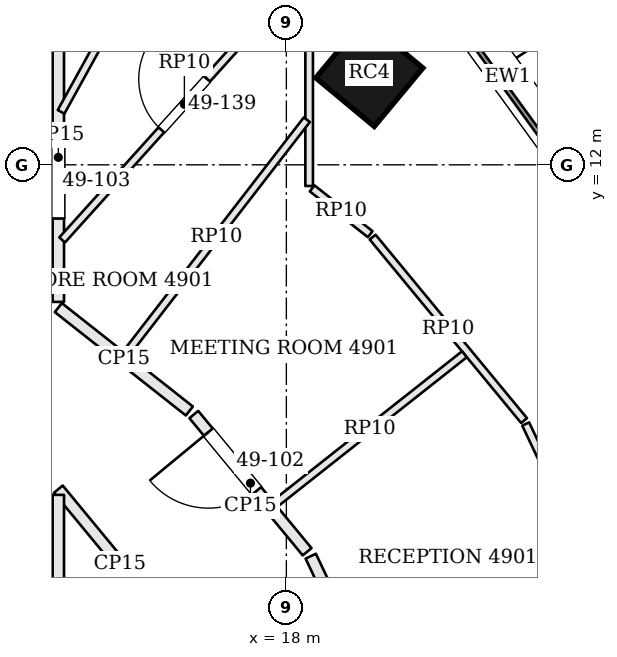
"""IFC4 building model, lengths in metres.
Left out: names, types, materials, properties, quantities, classifications, styles, units other than length and angle.
Written with IfcOpenShell. Run it as: python <this file> out.ifc"""

import sys

from ifc_helpers import new_model, si_unit, direction, frame, frame_2d, origin, origin_2d, place, context, subcontext, project, spatial, rectangle, extrude, element, fill, save


model = new_model("IFC4")
c1 = context("Model", 3, precision=1e-05, world=origin(), true_north=direction((0.0, 1.0)))
c2 = subcontext(c1, "Body", "Model", "MODEL_VIEW")
j1 = project(units=[si_unit("LENGTHUNIT", "METRE"), si_unit("PLANEANGLEUNIT", "RADIAN")], contexts=[c1])
p1 = place(None, origin())
s1 = spatial("IfcSite", under=j1, at=p1, CompositionType="ELEMENT")
p2 = place(p1, origin())
s2 = spatial("IfcBuilding", under=s1, at=p2, CompositionType="ELEMENT")
p3 = place(p2, frame((0.0, 0.0, 201.3)))
s3 = spatial("IfcBuildingStorey", under=s2, at=p3, CompositionType="ELEMENT", Elevation=201.3)
p4 = place(p3, frame((19.092, 13.209, 0.0), z_axis=(0.0, 0.0, 1.0), x_axis=(-0.76886986222, 0.63940529789, 0.0)))
e1 = element("IfcColumn", 1, at=p4, inside=s3, PredefinedType="COLUMN", context=c2, shape_type="SweptSolid", body=[
    extrude(rectangle(XDim=1.0, YDim=1.0, at=origin_2d()), origin(), (0.0, 0.0, 1.0), 3.9),
])
p5 = place(p3, frame((21.872, 11.841, 0.0), z_axis=(0.0, 0.0, 1.0), x_axis=(-0.587562050363, 0.809179113036, 0.0)))
e2 = element("IfcWall", 2, at=p5, inside=s3, PredefinedType="SOLIDWALL", context=c2, shape_type="SweptSolid", body=[
    extrude(rectangle(XDim=3.263, YDim=0.45, at=frame_2d((1.631, 0.0))), origin(), (0.0, 0.0, 1.0), 3.7),
])
p6 = place(p5, frame((0.582, 0.0, 0.9)))
e3 = element("IfcOpeningElement", 3, at=p6, cuts=e2, PredefinedType="OPENING", context=c2, shape_type="SweptSolid", body=[
    extrude(rectangle(XDim=2.1, YDim=2.3, at=frame_2d((1.05, 1.15))), frame((0.0, 0.235, 0.0), z_axis=(0.0, -1.0, 0.0), x_axis=(1.0, 0.0, 0.0)), (0.0, 0.0, 1.0), 0.47),
])
p7 = place(p3, frame((19.305, 4.773, 0.0), z_axis=(0.0, 0.0, 1.0), x_axis=(-0.428173054138, 0.903696760927, 0.0)))
e4 = element("IfcWall", 4, at=p7, inside=s3, PredefinedType="PARTITIONING", context=c2, shape_type="SweptSolid", body=[
    extrude(rectangle(XDim=2.3, YDim=0.15, at=frame_2d((1.15, 0.0))), origin(), (0.0, 0.0, 1.0), 3.084),
])
p8 = place(p7, frame((0.65, 0.0, 0.0)))
e5 = element("IfcOpeningElement", 5, at=p8, cuts=e4, PredefinedType="OPENING", context=c2, shape_type="SweptSolid", body=[
    extrude(rectangle(XDim=1.0, YDim=2.1, at=frame_2d((0.5, 1.05))), frame((0.0, 0.085, 0.0), z_axis=(0.0, -1.0, 0.0), x_axis=(1.0, 0.0, 0.0)), (0.0, 0.0, 1.0), 0.17),
])
p9 = place(p3, frame((18.273, 6.909, 0.0), z_axis=(0.0, 0.0, 1.0), x_axis=(-0.63653648943, 0.771246586783, 0.0)))
e6 = element("IfcWall", 6, at=p9, inside=s3, PredefinedType="PARTITIONING", context=c2, shape_type="SweptSolid", body=[
    extrude(rectangle(XDim=2.342, YDim=0.15, at=frame_2d((1.171, 0.0))), origin(), (0.0, 0.0, 1.0), 3.084),
])
p10 = place(p9, frame((1.041, 0.0, 0.0)))
e7 = element("IfcOpeningElement", 7, at=p10, cuts=e6, PredefinedType="OPENING", context=c2, shape_type="SweptSolid", body=[
    extrude(rectangle(XDim=1.0, YDim=2.4, at=frame_2d((0.5, 1.2))), frame((0.0, 0.085, 0.0), z_axis=(0.0, -1.0, 0.0), x_axis=(1.0, 0.0, 0.0)), (0.0, 0.0, 1.0), 0.17),
])
p11 = place(p3, frame((16.724, 8.761, 0.0), z_axis=(0.0, 0.0, 1.0), x_axis=(-0.785124633057, 0.619337800047, 0.0)))
e8 = element("IfcWall", 8, at=p11, inside=s3, PredefinedType="PARTITIONING", context=c2, shape_type="SweptSolid", body=[
    extrude(rectangle(XDim=2.196, YDim=0.15, at=frame_2d((1.098, 0.0))), origin(), (0.0, 0.0, 1.0), 3.084),
])
p12 = place(p3, frame((15.0, 10.196, 0.0), z_axis=(0.0, 0.0, 1.0), x_axis=(0.0, 1.0, 0.0)))
e9 = element("IfcWall", 9, at=p12, inside=s3, PredefinedType="PARTITIONING", context=c2, shape_type="SweptSolid", body=[
    extrude(rectangle(XDim=3.804, YDim=0.15, at=frame_2d((1.902, 0.0))), origin(), (0.0, 0.0, 1.0), 3.084),
])
p13 = place(p12, frame((1.097, 0.0, 0.0)))
e10 = element("IfcOpeningElement", 10, at=p13, cuts=e9, PredefinedType="OPENING", context=c2, shape_type="SweptSolid", body=[
    extrude(rectangle(XDim=1.0, YDim=2.4, at=frame_2d((0.5, 1.2))), frame((0.0, 0.085, 0.0), z_axis=(0.0, -1.0, 0.0), x_axis=(1.0, 0.0, 0.0)), (0.0, 0.0, 1.0), 0.17),
])
p14 = place(p3, frame((15.0, 7.733, 0.0), z_axis=(0.0, 0.0, 1.0), x_axis=(0.636601263488, -0.771193121938, 0.0)))
e11 = element("IfcWall", 11, at=p14, inside=s3, PredefinedType="PARTITIONING", context=c2, shape_type="SweptSolid", body=[
    extrude(rectangle(XDim=2.545, YDim=0.15, at=frame_2d((1.272, 0.0))), origin(), (0.0, 0.0, 1.0), 3.084),
])
p15 = place(p3, frame((15.0, -4.925, 0.0), z_axis=(0.0, 0.0, 1.0), x_axis=(0.0, 1.0, 0.0)))
e12 = element("IfcWall", 12, at=p15, inside=s3, PredefinedType="PARTITIONING", context=c2, shape_type="SweptSolid", body=[
    extrude(rectangle(XDim=12.583, YDim=0.15, at=frame_2d((6.292, 0.0))), origin(), (0.0, 0.0, 1.0), 3.084),
])
p16 = place(p15, frame((8.291, 0.0, 0.0)))
e13 = element("IfcOpeningElement", 13, at=p16, cuts=e12, PredefinedType="OPENING", context=c2, shape_type="SweptSolid", body=[
    extrude(rectangle(XDim=1.0, YDim=2.1, at=frame_2d((0.5, 1.05))), frame((0.0, 0.085, 0.0), z_axis=(0.0, -1.0, 0.0), x_axis=(1.0, 0.0, 0.0)), (0.0, 0.0, 1.0), 0.17),
])
p17 = place(p3, frame((18.3, 17.487, 0.0), z_axis=(0.0, 0.0, 1.0), x_axis=(4.2344173e-05, -0.999999999103, 0.0)))
e14 = element("IfcWall", 14, at=p17, inside=s3, PredefinedType="PARTITIONING", context=c2, shape_type="SweptSolid", body=[
    extrude(rectangle(XDim=5.766, YDim=0.1, at=frame_2d((2.883, 0.0))), origin(), (0.0, 0.0, 1.0), 3.084),
])
p18 = place(p17, frame((1.65, 0.0, 0.0)))
e15 = element("IfcOpeningElement", 15, at=p18, cuts=e14, PredefinedType="OPENING", context=c2, shape_type="SweptSolid", body=[
    extrude(rectangle(XDim=1.0, YDim=2.4, at=frame_2d((0.5, 1.2))), frame((0.0, 0.06, 0.0), z_axis=(0.0, -1.0, 0.0), x_axis=(1.0, 0.0, 0.0)), (0.0, 0.0, 1.0), 0.12),
])
p19 = place(p3, frame((18.339, 11.69, 0.0), z_axis=(0.0, 0.0, 1.0), x_axis=(0.785133114635, -0.619327047934, 0.0)))
e16 = element("IfcWall", 16, at=p19, inside=s3, PredefinedType="PARTITIONING", context=c2, shape_type="SweptSolid", body=[
    extrude(rectangle(XDim=0.973, YDim=0.1, at=frame_2d((0.487, 0.0))), origin(), (0.0, 0.0, 1.0), 3.084),
])
p20 = place(p3, frame((19.135, 11.049, 0.0), z_axis=(0.0, 0.0, 1.0), x_axis=(0.636562826748, -0.771224848927, 0.0)))
e17 = element("IfcWall", 17, at=p20, inside=s3, PredefinedType="PARTITIONING", context=c2, shape_type="SweptSolid", body=[
    extrude(rectangle(XDim=3.129, YDim=0.1, at=frame_2d((1.564, 0.0))), origin(), (0.0, 0.0, 1.0), 3.084),
])
p21 = place(p3, frame((21.149, 8.59, 0.0), z_axis=(0.0, 0.0, 1.0), x_axis=(0.428134173248, -0.903715181734, 0.0)))
e18 = element("IfcWall", 18, at=p21, inside=s3, PredefinedType="PARTITIONING", context=c2, shape_type="SweptSolid", body=[
    extrude(rectangle(XDim=3.072, YDim=0.1, at=frame_2d((1.536, 0.0))), origin(), (0.0, 0.0, 1.0), 3.084),
])
p22 = place(p21, frame((1.6, 0.0, 0.0)))
e19 = element("IfcOpeningElement", 19, at=p22, cuts=e18, PredefinedType="OPENING", context=c2, shape_type="SweptSolid", body=[
    extrude(rectangle(XDim=1.0, YDim=2.1, at=frame_2d((0.5, 1.05))), frame((0.0, 0.06, 0.0), z_axis=(0.0, -1.0, 0.0), x_axis=(1.0, 0.0, 0.0)), (0.0, 0.0, 1.0), 0.12),
])
p23 = place(p3, frame((17.85, 7.54, 0.0), z_axis=(0.0, 0.0, 1.0), x_axis=(0.784835535168, 0.619704109021, 0.0)))
e20 = element("IfcWall", 20, at=p23, inside=s3, PredefinedType="PARTITIONING", context=c2, shape_type="SweptSolid", body=[
    extrude(rectangle(XDim=3.176, YDim=0.1, at=frame_2d((1.588, 0.0))), origin(), (0.0, 0.0, 1.0), 3.084),
])
p24 = place(p3, frame((15.89, 9.515, 0.0), z_axis=(0.0, 0.0, 1.0), x_axis=(0.611483217527, 0.791257401028, 0.0)))
e21 = element("IfcWall", 21, at=p24, inside=s3, PredefinedType="PARTITIONING", context=c2, shape_type="SweptSolid", body=[
    extrude(rectangle(XDim=3.891, YDim=0.1, at=frame_2d((1.945, 0.0))), origin(), (0.0, 0.0, 1.0), 3.084),
])
p25 = place(p3, frame((15.05, 11.011, 0.0), z_axis=(0.0, 0.0, 1.0), x_axis=(0.669413787396, 0.742889750397, 0.0)))
e22 = element("IfcWall", 22, at=p25, inside=s3, PredefinedType="PARTITIONING", context=c2, shape_type="SweptSolid", body=[
    extrude(rectangle(XDim=4.805, YDim=0.1, at=frame_2d((2.402, 0.0))), origin(), (0.0, 0.0, 1.0), 3.084),
])
p26 = place(p25, frame((1.95, 0.0, 0.0)))
e23 = element("IfcOpeningElement", 23, at=p26, cuts=e22, PredefinedType="OPENING", context=c2, shape_type="SweptSolid", body=[
    extrude(rectangle(XDim=0.9, YDim=2.1, at=frame_2d((0.45, 1.05))), frame((0.0, 0.06, 0.0), z_axis=(0.0, -1.0, 0.0), x_axis=(1.0, 0.0, 0.0)), (0.0, 0.0, 1.0), 0.12),
])
p27 = place(p3, frame((15.036, 12.697, 0.0), z_axis=(0.0, 0.0, 1.0), x_axis=(0.482822947205, 0.87571799208, 0.0)))
e24 = element("IfcWall", 24, at=p27, inside=s3, PredefinedType="PARTITIONING", context=c2, shape_type="SweptSolid", body=[
    extrude(rectangle(XDim=6.166, YDim=0.1, at=frame_2d((3.083, 0.0))), origin(), (0.0, 0.0, 1.0), 3.084),
])
p28 = place(p6, origin())
e25 = element("IfcWindow", 25, at=p28, inside=s3, PartitioningType="SINGLE_PANEL", PredefinedType="WINDOW", context=c2, shape_type="SweptSolid", body=[
    extrude(rectangle(XDim=2.1, YDim=2.3, at=frame_2d((1.05, 1.15))), frame((0.0, 0.135, 0.0), z_axis=(0.0, -1.0, 0.0), x_axis=(1.0, 0.0, 0.0)), (0.0, 0.0, 1.0), 0.06),
])
fill(e3, e25)
p29 = place(p10, origin())
e26 = element("IfcDoor", 26, at=p29, inside=s3, OperationType="SINGLE_SWING_RIGHT", PredefinedType="DOOR", context=c2, shape_type="SweptSolid", body=[
    extrude(rectangle(XDim=1.0, YDim=2.4, at=frame_2d((0.5, 1.2))), frame((0.0, 0.025, 0.0), z_axis=(0.0, -1.0, 0.0), x_axis=(1.0, 0.0, 0.0)), (0.0, 0.0, 1.0), 0.05),
])
fill(e7, e26)
p30 = place(p13, origin())
e27 = element("IfcDoor", 27, at=p30, inside=s3, OperationType="SINGLE_SWING_RIGHT", PredefinedType="DOOR", context=c2, shape_type="SweptSolid", body=[
    extrude(rectangle(XDim=1.0, YDim=2.4, at=frame_2d((0.5, 1.2))), frame((0.0, 0.025, 0.0), z_axis=(0.0, -1.0, 0.0), x_axis=(1.0, 0.0, 0.0)), (0.0, 0.0, 1.0), 0.05),
])
fill(e10, e27)
p31 = place(p26, origin())
e28 = element("IfcDoor", 28, at=p31, inside=s3, OperationType="SINGLE_SWING_RIGHT", PredefinedType="DOOR", context=c2, shape_type="SweptSolid", body=[
    extrude(rectangle(XDim=0.9, YDim=2.1, at=frame_2d((0.45, 1.05))), frame((0.0, 0.025, 0.0), z_axis=(0.0, -1.0, 0.0), x_axis=(1.0, 0.0, 0.0)), (0.0, 0.0, 1.0), 0.05),
])
fill(e23, e28)
save(model, sys.argv[1])
